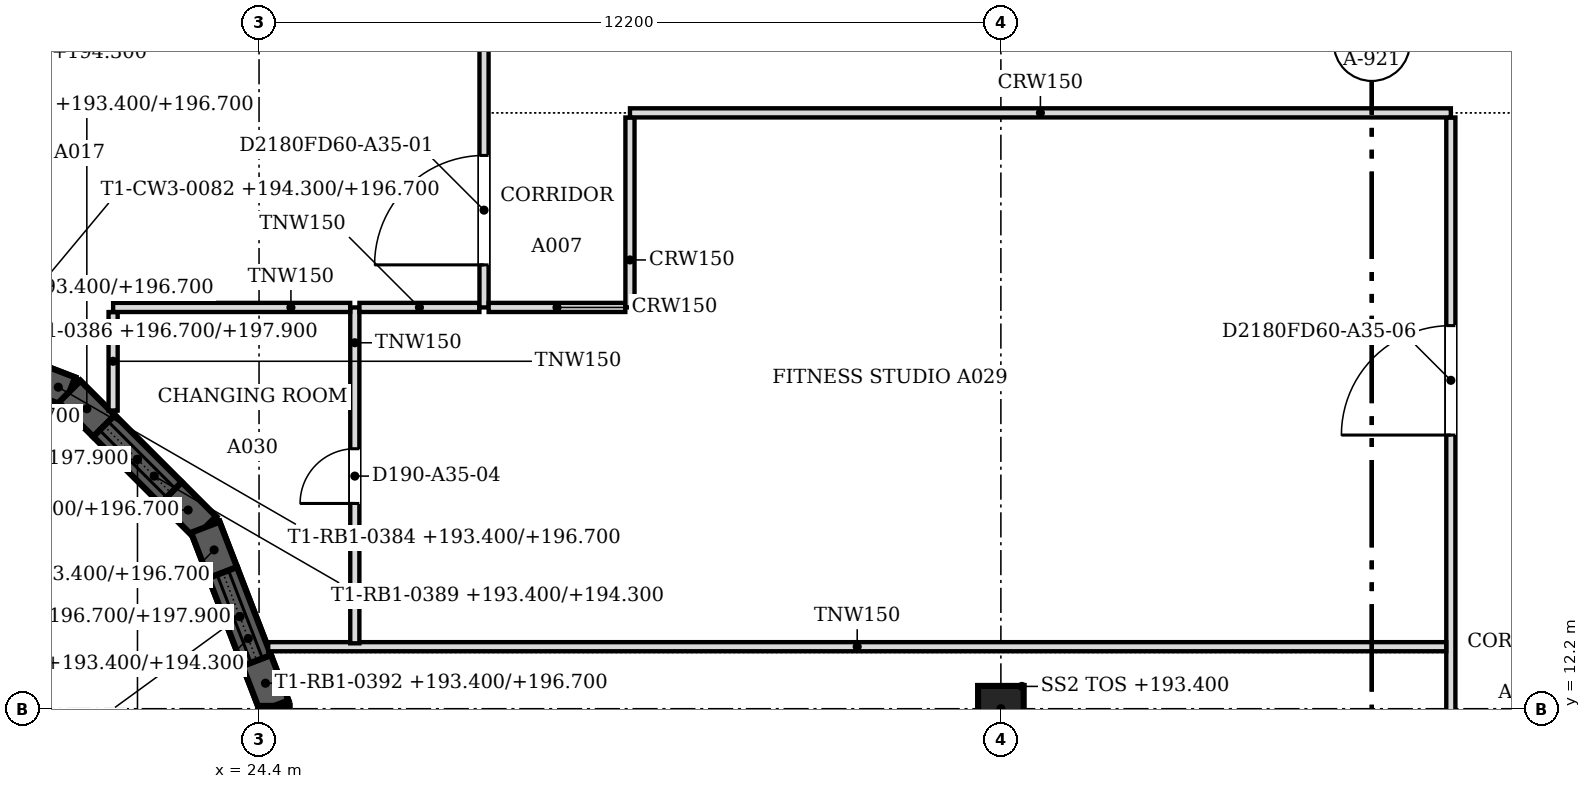
"""IFC4 building model, lengths in metres.
Left out: names, types, materials, properties, quantities, classifications, styles, units other than length and angle.
Written with IfcOpenShell. Run it as: python <this file> out.ifc"""

import sys

from ifc_helpers import new_model, si_unit, direction, frame, frame_2d, origin, origin_2d, place, context, subcontext, project, spatial, polyline, rectangle, outline, extrude, faceted_brep, source, transform, mapped, element, fill, save


model = new_model("IFC4")
c1 = context("Model", 3, precision=1e-05, world=origin(), true_north=direction((0.0, 1.0)))
c2 = subcontext(c1, "Body", "Model", "MODEL_VIEW")
j1 = project(units=[si_unit("LENGTHUNIT", "METRE"), si_unit("PLANEANGLEUNIT", "RADIAN")], contexts=[c1])
p1 = place(None, origin())
s1 = spatial("IfcSite", under=j1, at=p1, CompositionType="ELEMENT")
p2 = place(p1, origin())
s2 = spatial("IfcBuilding", under=s1, at=p2, CompositionType="ELEMENT")
p3 = place(p2, frame((0.0, 0.0, 193.4)))
s3 = spatial("IfcBuildingStorey", under=s2, at=p3, CompositionType="ELEMENT", Elevation=193.4)
p4 = place(p3, frame((36.6, 12.2, 0.0), z_axis=(0.0, 0.0, 1.0), x_axis=(1.0, 0.0, 0.0)))
e1 = element("IfcColumn", 1, at=p4, inside=s3, PredefinedType="COLUMN", context=c2, shape_type="SweptSolid", body=[
    extrude(rectangle(XDim=0.75, YDim=0.75, at=origin_2d()), origin(), (0.0, 0.0, 1.0), 4.3),
])
m1 = source(origin(), c2, "Body", "Brep", [
    faceted_brep([(0.0, -0.25, 0.0), (0.747, -0.25, 0.0), (0.747, -0.25, 3.3), (0.0, -0.25, 3.3), (0.0, 0.25, 3.3), (0.8, 0.25, 3.3), (0.8, 0.25, 0.0), (0.0, 0.25, 0.0), (0.8, 0.0, 0.0), (0.8, 0.0, 3.3)], [[[0, 1, 2, 3]], [[4, 5, 6, 7]], [[7, 6, 8, 1, 0]], [[6, 5, 9, 8]], [[5, 4, 3, 2, 9]], [[4, 7, 0, 3]], [[1, 8, 9, 2]]]),
])
p5 = place(p3, frame((20.539, 17.704, 0.0), z_axis=(0.0, 0.0, 1.0), x_axis=(0.93301483327, -0.3598379092, 0.0)))
e2 = element("IfcWall", 2, at=p5, inside=s3, PredefinedType="SOLIDWALL", context=c2, shape_type="MappedRepresentation", body=[
    mapped(m1, transform((0.0, 0.0, 0.0), scale=1.0)),
])
m2 = source(origin(), c2, "Body", "Brep", [
    faceted_brep([(0.047, -0.25, 0.0), (3.096, -0.25, 0.0), (3.096, -0.25, 1.2), (0.047, -0.25, 1.2), (0.0, 0.25, 1.2), (3.149, 0.25, 1.2), (3.149, 0.25, 0.0), (0.0, 0.25, 0.0), (3.149, -0.0, 0.0), (0.0, 0.0, 0.0), (3.149, -0.0, 1.2), (0.0, 0.0, 1.2)], [[[0, 1, 2, 3]], [[4, 5, 6, 7]], [[7, 6, 8, 1, 0, 9]], [[6, 5, 10, 8]], [[5, 4, 11, 3, 2, 10]], [[4, 7, 9, 11]], [[9, 0, 3, 11]], [[1, 8, 10, 2]]]),
])
p6 = place(p3, frame((18.346, 18.55, 3.3), z_axis=(0.0, 0.0, 1.0), x_axis=(0.932987528699, -0.35990869855, 0.0)))
e3 = element("IfcWall", 3, at=p6, inside=s3, PredefinedType="SOLIDWALL", context=c2, shape_type="MappedRepresentation", body=[
    mapped(m2, transform((0.0, 0.0, 0.0), scale=1.0)),
])
m3 = source(origin(), c2, "Body", "Brep", [
    faceted_brep([(0.053, -0.25, 0.0), (0.8, -0.25, 0.0), (0.8, -0.25, 3.3), (0.053, -0.25, 3.3), (0.0, 0.25, 3.3), (0.8, 0.25, 3.3), (0.8, 0.25, 0.0), (0.0, 0.25, 0.0), (0.0, 0.0, 0.0), (0.0, 0.0, 3.3)], [[[0, 1, 2, 3]], [[4, 5, 6, 7]], [[7, 6, 1, 0, 8]], [[5, 4, 9, 3, 2]], [[4, 7, 8, 9]], [[8, 0, 3, 9]], [[1, 6, 5, 2]]]),
])
p7 = place(p3, frame((21.285, 17.417, 0.0), z_axis=(0.0, 0.0, 1.0), x_axis=(0.707106781187, -0.707106781187, 0.0)))
e4 = element("IfcWall", 4, at=p7, inside=s3, PredefinedType="SOLIDWALL", context=c2, shape_type="MappedRepresentation", body=[
    mapped(m3, transform((0.0, 0.0, 0.0), scale=1.0)),
])
m4 = source(origin(), c2, "Body", "Brep", [
    faceted_brep([(0.0, -0.25, 0.0), (0.747, -0.25, 0.0), (0.747, -0.25, 3.3), (0.0, -0.25, 3.3), (0.0, 0.25, 3.3), (0.8, 0.25, 3.3), (0.8, 0.25, 0.0), (0.0, 0.25, 0.0), (0.8, 0.0, 0.0), (0.8, 0.0, 3.3)], [[[0, 1, 2, 3]], [[4, 5, 6, 7]], [[7, 6, 8, 1, 0]], [[6, 5, 9, 8]], [[5, 4, 3, 2, 9]], [[4, 7, 0, 3]], [[1, 8, 9, 2]]]),
])
p8 = place(p3, frame((22.951, 15.751, 0.0), z_axis=(0.0, 0.0, 1.0), x_axis=(0.707106781187, -0.707106781187, 0.0)))
e5 = element("IfcWall", 5, at=p8, inside=s3, PredefinedType="SOLIDWALL", context=c2, shape_type="MappedRepresentation", body=[
    mapped(m4, transform((0.0, 0.0, 0.0), scale=1.0)),
])
m5 = source(origin(), c2, "Body", "SweptSolid", [
    extrude(outline(polyline([(0.0, 0.0), (1.556, 0.0), (1.556, 0.9), (0.0, 0.9), (0.0, 0.0)])), frame((0.0, 0.25, 0.0), z_axis=(0.0, -1.0, 0.0), x_axis=(1.0, 0.0, 0.0)), (0.0, 0.0, 1.0), 0.5),
])
p9 = place(p3, frame((21.851, 16.851, 0.0), z_axis=(0.0, 0.0, 1.0), x_axis=(0.707185230931, -0.707028322737, 0.0)))
e6 = element("IfcWall", 6, at=p9, inside=s3, PredefinedType="SOLIDWALL", context=c2, shape_type="MappedRepresentation", body=[
    mapped(m5, transform((0.0, 0.0, 0.0), scale=1.0)),
])
m6 = source(origin(), c2, "Body", "Brep", [
    faceted_brep([(0.053, -0.25, 0.0), (3.103, -0.25, 0.0), (3.103, -0.25, 1.2), (0.053, -0.25, 1.2), (0.0, 0.25, 1.2), (3.156, 0.25, 1.2), (3.156, 0.25, 0.0), (0.0, 0.25, 0.0), (3.156, -0.0, 0.0), (0.0, 0.0, 0.0), (3.156, -0.0, 1.2), (0.0, 0.0, 1.2)], [[[0, 1, 2, 3]], [[4, 5, 6, 7]], [[7, 6, 8, 1, 0, 9]], [[6, 5, 10, 8]], [[5, 4, 11, 3, 2, 10]], [[4, 7, 9, 11]], [[9, 0, 3, 11]], [[1, 8, 10, 2]]]),
])
p10 = place(p3, frame((21.285, 17.417, 3.3), z_axis=(0.0, 0.0, 1.0), x_axis=(0.707106781187, -0.707106781187, 0.0)))
e7 = element("IfcWall", 7, at=p10, inside=s3, PredefinedType="SOLIDWALL", context=c2, shape_type="MappedRepresentation", body=[
    mapped(m6, transform((0.0, 0.0, 0.0), scale=1.0)),
])
p11 = place(p3, frame((23.517, 15.185, 0.0), z_axis=(0.0, 0.0, 1.0), x_axis=(0.359735468129, -0.933054335486, 0.0)))
e8 = element("IfcWall", 8, at=p11, inside=s3, PredefinedType="SOLIDWALL", context=c2, shape_type="MappedRepresentation", body=[
    mapped(m3, transform((0.0, 0.0, 0.0), scale=1.0)),
])
m7 = source(origin(), c2, "Body", "Brep", [
    faceted_brep([(0.0, -0.25, 0.0), (0.753, -0.25, 0.0), (0.753, -0.25, 3.3), (0.0, -0.25, 3.3), (0.0, 0.25, 3.3), (0.8, 0.25, 3.3), (0.8, 0.25, 0.0), (0.0, 0.25, 0.0), (0.8, 0.0, 0.0), (0.8, 0.0, 3.3)], [[[0, 1, 2, 3]], [[4, 5, 6, 7]], [[7, 6, 8, 1, 0]], [[6, 5, 9, 8]], [[5, 4, 3, 2, 9]], [[4, 7, 0, 3]], [[1, 8, 9, 2]]]),
])
p12 = place(p3, frame((24.362, 12.993, 0.0), z_axis=(0.0, 0.0, 1.0), x_axis=(0.3598379092, -0.93301483327, 0.0)))
e9 = element("IfcWall", 9, at=p12, inside=s3, PredefinedType="SOLIDWALL", context=c2, shape_type="MappedRepresentation", body=[
    mapped(m7, transform((0.0, 0.0, 0.0), scale=1.0)),
])
m8 = source(origin(), c2, "Body", "Brep", [
    faceted_brep([(0.0, -0.25, 0.0), (1.549, -0.25, 0.0), (1.549, -0.25, 0.9), (0.0, -0.25, 0.9), (0.0, 0.25, 0.9), (1.549, 0.25, 0.9), (1.549, 0.25, 0.0), (0.0, 0.25, 0.0)], [[[0, 1, 2, 3]], [[4, 5, 6, 7]], [[7, 6, 1, 0]], [[5, 4, 3, 2]], [[4, 7, 0, 3]], [[1, 6, 5, 2]]]),
])
p13 = place(p3, frame((23.804, 14.438, 0.0), z_axis=(0.0, 0.0, 1.0), x_axis=(0.359897541845, -0.932991832426, 0.0)))
e10 = element("IfcWall", 10, at=p13, inside=s3, PredefinedType="SOLIDWALL", context=c2, shape_type="MappedRepresentation", body=[
    mapped(m8, transform((0.0, 0.0, 0.0), scale=1.0)),
])
m9 = source(origin(), c2, "Body", "Brep", [
    faceted_brep([(0.053, -0.25, 0.0), (3.103, -0.25, 0.0), (3.103, -0.25, 1.2), (0.053, -0.25, 1.2), (0.0, 0.25, 1.2), (3.149, 0.25, 1.2), (3.149, 0.25, 0.0), (0.0, 0.25, 0.0), (3.149, -0.0, 0.0), (0.0, 0.0, 0.0), (3.149, -0.0, 1.2), (0.0, 0.0, 1.2)], [[[0, 1, 2, 3]], [[4, 5, 6, 7]], [[7, 6, 8, 1, 0, 9]], [[6, 5, 10, 8]], [[5, 4, 11, 3, 2, 10]], [[4, 7, 9, 11]], [[9, 0, 3, 11]], [[1, 8, 10, 2]]]),
])
p14 = place(p3, frame((23.517, 15.185, 3.3), z_axis=(0.0, 0.0, 1.0), x_axis=(0.359841220347, -0.933013556246, 0.0)))
e11 = element("IfcWall", 11, at=p14, inside=s3, PredefinedType="SOLIDWALL", context=c2, shape_type="MappedRepresentation", body=[
    mapped(m9, transform((0.0, 0.0, 0.0), scale=1.0)),
])
m10 = source(origin(), c2, "Body", "Brep", [
    faceted_brep([(0.047, -0.25, 0.0), (0.8, -0.25, 0.0), (0.8, -0.25, 3.3), (0.047, -0.25, 3.3), (0.0, 0.25, 3.3), (0.8, 0.25, 3.3), (0.8, 0.25, 0.0), (0.0, 0.25, 0.0), (0.0, 0.0, 0.0), (0.0, 0.0, 3.3)], [[[0, 1, 2, 3]], [[4, 5, 6, 7]], [[7, 6, 1, 0, 8]], [[5, 4, 9, 3, 2]], [[4, 7, 8, 9]], [[8, 0, 3, 9]], [[1, 6, 5, 2]]]),
])
p15 = place(p3, frame((24.65, 12.247, 0.0), z_axis=(0.0, 0.0, 1.0), x_axis=(0.0, -1.0, 0.0)))
e12 = element("IfcWall", 12, at=p15, inside=s3, PredefinedType="SOLIDWALL", context=c2, shape_type="MappedRepresentation", body=[
    mapped(m10, transform((0.0, 0.0, 0.0), scale=1.0)),
])
m11 = source(origin(), c2, "Body", "Brep", [
    faceted_brep([(0.047, -0.25, 0.0), (6.1, -0.25, 0.0), (6.1, -0.25, 1.2), (0.047, -0.25, 1.2), (0.0, 0.25, 1.2), (6.053, 0.25, 1.2), (6.053, 0.25, 0.0), (0.0, 0.25, 0.0), (6.1, -0.0, 0.0), (0.0, 0.0, 0.0), (6.1, -0.0, 1.2), (0.0, 0.0, 1.2)], [[[0, 1, 2, 3]], [[4, 5, 6, 7]], [[7, 6, 8, 1, 0, 9]], [[10, 2, 1, 8]], [[5, 4, 11, 3, 2, 10]], [[4, 7, 9, 11]], [[9, 0, 3, 11]], [[8, 6, 5, 10]]]),
])
p16 = place(p3, frame((24.65, 12.247, 3.3), z_axis=(0.0, 0.0, 1.0), x_axis=(0.0, -1.0, 0.0)))
e13 = element("IfcWall", 13, at=p16, inside=s3, PredefinedType="SOLIDWALL", context=c2, shape_type="MappedRepresentation", body=[
    mapped(m11, transform((0.0, 0.0, 0.0), scale=1.0)),
])
p17 = place(p3, frame((44.0, 0.5, 0.0), z_axis=(0.0, 0.0, 1.0), x_axis=(0.0, 1.0, 0.0)))
e14 = element("IfcWall", 14, at=p17, inside=s3, PredefinedType="PARTITIONING", context=c2, shape_type="SweptSolid", body=[
    extrude(rectangle(XDim=21.424, YDim=0.15, at=frame_2d((10.712, 0.0))), origin(), (0.0, 0.0, 1.0), 3.767),
])
m12 = source(origin(), c2, "Body", "SweptSolid", [
    extrude(rectangle(XDim=1.8, YDim=2.1, at=frame_2d((0.9, 1.05))), frame((0.0, 0.085, 0.0), z_axis=(0.0, -1.0, 0.0), x_axis=(1.0, 0.0, 0.0)), (0.0, 0.0, 1.0), 0.17),
])
p18 = place(p17, frame((16.201, 0.0, 0.0)))
e15 = element("IfcOpeningElement", 15, at=p18, cuts=e14, PredefinedType="OPENING", context=c2, shape_type="MappedRepresentation", body=[
    mapped(m12, transform((0.0, 0.0, 0.0), scale=1.0)),
])
p19 = place(p17, frame((7.3, 0.0, 0.0)))
e16 = element("IfcOpeningElement", 16, at=p19, cuts=e14, PredefinedType="OPENING", context=c2, shape_type="MappedRepresentation", body=[
    mapped(m12, transform((0.0, 0.0, 0.0), scale=1.0)),
])
p20 = place(p3, frame((24.55, 13.22, 0.0), z_axis=(0.0, 0.0, 1.0), x_axis=(1.0, 0.0, 0.0)))
e17 = element("IfcWall", 17, at=p20, inside=s3, PredefinedType="PARTITIONING", context=c2, shape_type="SweptSolid", body=[
    extrude(rectangle(XDim=19.374, YDim=0.15, at=frame_2d((9.687, 0.0))), origin(), (0.0, 0.0, 1.0), 3.767),
])
p21 = place(p3, frame((25.975, 13.276, 0.0), z_axis=(0.0, 0.0, 1.0), x_axis=(0.0, 1.0, 0.0)))
e18 = element("IfcWall", 18, at=p21, inside=s3, PredefinedType="PARTITIONING", context=c2, shape_type="SweptSolid", body=[
    extrude(rectangle(XDim=5.524, YDim=0.15, at=frame_2d((2.762, 0.0))), origin(), (0.0, 0.0, 1.0), 3.767),
])
m13 = source(origin(), c2, "Body", "SweptSolid", [
    extrude(rectangle(XDim=0.9, YDim=2.1, at=frame_2d((0.45, 1.05))), frame((0.0, 0.085, 0.0), z_axis=(0.0, -1.0, 0.0), x_axis=(1.0, 0.0, 0.0)), (0.0, 0.0, 1.0), 0.17),
])
p22 = place(p21, frame((2.3, 0.0, 0.0)))
e19 = element("IfcOpeningElement", 19, at=p22, cuts=e18, PredefinedType="OPENING", context=c2, shape_type="MappedRepresentation", body=[
    mapped(m13, transform((0.0, 0.0, 0.0), scale=1.0)),
])
p23 = place(p3, frame((22.0, 17.105, 0.0), z_axis=(0.0, 0.0, 1.0), x_axis=(0.0, 1.0, 0.0)))
e20 = element("IfcWall", 20, at=p23, inside=s3, PredefinedType="PARTITIONING", context=c2, shape_type="SweptSolid", body=[
    extrude(rectangle(XDim=1.619, YDim=0.15, at=frame_2d((0.81, 0.0))), origin(), (0.0, 0.0, 1.0), 3.767),
])
p24 = place(p3, frame((22.0, 18.8, 0.0), z_axis=(0.0, 0.0, 1.0), x_axis=(1.0, 0.0, 0.0)))
e21 = element("IfcWall", 21, at=p24, inside=s3, PredefinedType="PARTITIONING", context=c2, shape_type="SweptSolid", body=[
    extrude(rectangle(XDim=3.899, YDim=0.15, at=frame_2d((1.949, 0.0))), origin(), (0.0, 0.0, 1.0), 3.767),
])
p25 = place(p3, frame((26.051, 18.8, 0.0), z_axis=(0.0, 0.0, 1.0), x_axis=(1.0, 0.0, 0.0)))
e22 = element("IfcWall", 22, at=p25, inside=s3, PredefinedType="PARTITIONING", context=c2, shape_type="SweptSolid", body=[
    extrude(rectangle(XDim=1.973, YDim=0.15, at=frame_2d((0.986, 0.0))), origin(), (0.0, 0.0, 1.0), 3.767),
])
p26 = place(p3, frame((28.1, 18.8, 0.0), z_axis=(0.0, 0.0, 1.0), x_axis=(0.0, 1.0, 0.0)))
e23 = element("IfcWall", 23, at=p26, inside=s3, PredefinedType="PARTITIONING", context=c2, shape_type="SweptSolid", body=[
    extrude(rectangle(XDim=26.024, YDim=0.15, at=frame_2d((13.012, 0.0))), origin(), (0.0, 0.0, 1.0), 3.767),
])
p27 = place(p26, frame((0.7, 0.0, 0.0)))
e24 = element("IfcOpeningElement", 24, at=p27, cuts=e23, PredefinedType="OPENING", context=c2, shape_type="MappedRepresentation", body=[
    mapped(m12, transform((0.0, 0.0, 0.0), scale=1.0)),
])
p28 = place(p26, frame((22.551, 0.0, 0.0)))
e25 = element("IfcOpeningElement", 25, at=p28, cuts=e23, PredefinedType="OPENING", context=c2, shape_type="MappedRepresentation", body=[
    mapped(m12, transform((0.0, 0.0, 0.0), scale=1.0)),
])
p29 = place(p26, frame((16.851, 0.0, 0.0)))
e26 = element("IfcOpeningElement", 26, at=p29, cuts=e23, PredefinedType="OPENING", context=c2, shape_type="MappedRepresentation", body=[
    mapped(m12, transform((0.0, 0.0, 0.0), scale=1.0)),
])
p30 = place(p26, frame((9.3, 0.0, 0.0)))
e27 = element("IfcOpeningElement", 27, at=p30, cuts=e23, PredefinedType="OPENING", context=c2, shape_type="MappedRepresentation", body=[
    mapped(m12, transform((0.0, 0.0, 0.0), scale=1.0)),
])
p31 = place(p3, frame((28.176, 18.8, 0.0), z_axis=(0.0, 0.0, 1.0), x_axis=(1.0, 0.0, 0.0)))
e28 = element("IfcWall", 28, at=p31, inside=s3, PredefinedType="PARTITIONING", context=c2, shape_type="SweptSolid", body=[
    extrude(rectangle(XDim=2.248, YDim=0.15, at=frame_2d((1.124, 0.0))), origin(), (0.0, 0.0, 1.0), 3.767),
])
p32 = place(p3, frame((30.5, 18.8, 0.0), z_axis=(0.0, 0.0, 1.0), x_axis=(0.0, 1.0, 0.0)))
e29 = element("IfcWall", 29, at=p32, inside=s3, PredefinedType="PARTITIONING", context=c2, shape_type="SweptSolid", body=[
    extrude(rectangle(XDim=3.124, YDim=0.15, at=frame_2d((1.562, 0.0))), origin(), (0.0, 0.0, 1.0), 3.767),
])
p33 = place(p3, frame((30.5, 22.0, 0.0), z_axis=(0.0, 0.0, 1.0), x_axis=(1.0, 0.0, 0.0)))
e30 = element("IfcWall", 30, at=p33, inside=s3, PredefinedType="PARTITIONING", context=c2, shape_type="SweptSolid", body=[
    extrude(rectangle(XDim=13.5, YDim=0.15, at=frame_2d((6.75, 0.0))), origin(), (0.0, 0.0, 1.0), 3.767),
])
m14 = source(origin(), c2, "Body", "SweptSolid", [
    extrude(rectangle(XDim=1.8, YDim=2.1, at=frame_2d((0.9, 1.05))), frame((0.0, 0.025, 0.0), z_axis=(0.0, -1.0, 0.0), x_axis=(1.0, 0.0, 0.0)), (0.0, 0.0, 1.0), 0.05),
])
p34 = place(p27, origin())
e31 = element("IfcDoor", 31, at=p34, inside=s3, OperationType="DOUBLE_DOOR_SINGLE_SWING", PredefinedType="DOOR", context=c2, shape_type="MappedRepresentation", body=[
    mapped(m14, transform((0.0, 0.0, 0.0), scale=1.0)),
])
fill(e24, e31)
m15 = source(origin(), c2, "Body", "SweptSolid", [
    extrude(rectangle(XDim=0.9, YDim=2.1, at=frame_2d((0.45, 1.05))), frame((0.0, 0.025, 0.0), z_axis=(0.0, -1.0, 0.0), x_axis=(1.0, 0.0, 0.0)), (0.0, 0.0, 1.0), 0.05),
])
p35 = place(p22, origin())
e32 = element("IfcDoor", 32, at=p35, inside=s3, OperationType="SINGLE_SWING_LEFT", PredefinedType="DOOR", context=c2, shape_type="MappedRepresentation", body=[
    mapped(m15, transform((0.0, 0.0, 0.0), scale=1.0)),
])
fill(e19, e32)
p36 = place(p18, origin())
e33 = element("IfcDoor", 33, at=p36, inside=s3, OperationType="DOUBLE_DOOR_SINGLE_SWING", PredefinedType="DOOR", context=c2, shape_type="MappedRepresentation", body=[
    mapped(m14, transform((0.0, 0.0, 0.0), scale=1.0)),
])
fill(e15, e33)
save(model, sys.argv[1])
